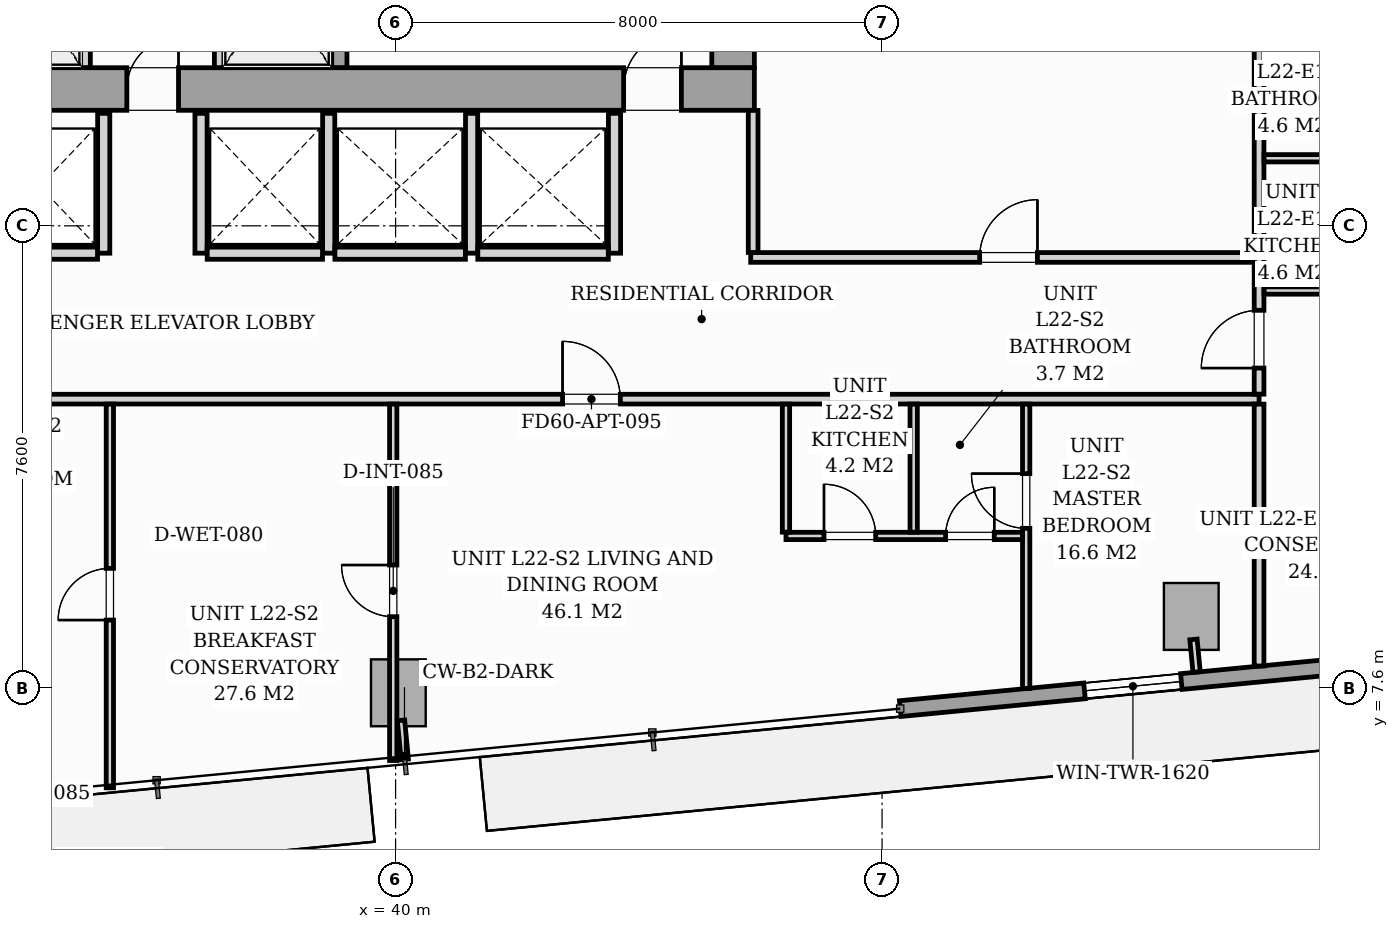
"""IFC4 building model, lengths in metres.
Left out: names, types, materials, properties, quantities, classifications, styles, units other than length and angle.
Written with IfcOpenShell. Run it as: python <this file> out.ifc"""

import sys

from ifc_helpers import new_model, si_unit, direction, frame, frame_2d, origin, origin_2d, place, context, subcontext, project, spatial, rectangle, i_section, extrude, source, transform, mapped, element, fill, save


model = new_model("IFC4")
c1 = context("Model", 3, precision=1e-05, world=origin(), true_north=direction((0.0, 1.0)))
c2 = subcontext(c1, "Body", "Model", "MODEL_VIEW")
j1 = project(units=[si_unit("LENGTHUNIT", "METRE"), si_unit("PLANEANGLEUNIT", "RADIAN")], contexts=[c1])
p1 = place(None, origin())
s1 = spatial("IfcSite", under=j1, at=p1, CompositionType="ELEMENT")
p2 = place(p1, origin())
s2 = spatial("IfcBuilding", under=s1, at=p2, CompositionType="ELEMENT")
p3 = place(p2, frame((0.0, 0.0, 81.0)))
s3 = spatial("IfcBuildingStorey", under=s2, at=p3, CompositionType="ELEMENT", Elevation=81.0)
m1 = source(origin(), c2, "Body", "SweptSolid", [
    extrude(i_section(OverallWidth=0.427, OverallDepth=0.483, WebThickness=0.051, FlangeThickness=0.082, FilletRadius=0.018, at=origin_2d()), origin(), (0.0, 0.0, 1.0), 3.196),
])
for number, where, z_axis, x_axis in (
    (1, (38.88, 17.4, 0.002), (0.0, 0.0, 1.0), (1.0, 0.0, 0.0)),
    (2, (45.6, 17.4, 0.002), (0.0, 0.0, 1.0), (1.0, 0.0, 0.0)),
):
    element("IfcColumn", number, at=place(p3, frame(where, z_axis=z_axis, x_axis=x_axis)), inside=s3, PredefinedType="PILASTER", context=c2, shape_type="MappedRepresentation", body=[
        mapped(m1, transform((0.0, 0.0, 0.0), scale=1.0)),
    ])
m2 = source(origin(), c2, "Body", "SweptSolid", [
    extrude(rectangle(XDim=0.9, YDim=1.1, at=origin_2d()), origin(), (0.0, 0.0, 1.0), 3.196),
])
for number, where, z_axis, x_axis in (
    (3, (40.045, 7.521, 0.002), (0.0, 0.0, 1.0), (0.995, 0.096, 0.0)),
    (4, (53.085, 8.776, 0.002), (0.0, 0.0, 1.0), (0.995, 0.096, 0.0)),
):
    element("IfcColumn", number, at=place(p3, frame(where, z_axis=z_axis, x_axis=x_axis)), inside=s3, PredefinedType="COLUMN", context=c2, shape_type="MappedRepresentation", body=[
        mapped(m2, transform((0.0, 0.0, 0.0), scale=1.0)),
    ])
p4 = place(p3, frame((67.32, 9.092, 0.0), z_axis=(0.0, 0.0, 1.0), x_axis=(-0.995396521236, -0.095842399342, 0.0)))
e5 = element("IfcWall", 5, at=p4, inside=s3, PredefinedType="STANDARD", context=c2, shape_type="SweptSolid", body=[
    extrude(rectangle(XDim=19.11, YDim=0.26, at=frame_2d((9.555, 0.0))), origin(), (0.0, 0.0, 1.0), 2.94),
])
p5 = place(p4, frame((9.563, 0.0, 0.0)))
e6 = element("IfcOpeningElement", 6, at=p5, cuts=e5, PredefinedType="OPENING", context=c2, shape_type="SweptSolid", body=[
    extrude(rectangle(XDim=1.8, YDim=2.06, at=frame_2d((0.9, 1.03))), frame((0.0, 0.14, 0.0), z_axis=(0.0, -1.0, 0.0), x_axis=(1.0, 0.0, 0.0)), (0.0, 0.0, 1.0), 0.28),
])
p6 = place(p4, frame((2.05, 0.0, 0.65)))
e7 = element("IfcOpeningElement", 7, at=p6, cuts=e5, PredefinedType="OPENING", context=c2, shape_type="SweptSolid", body=[
    extrude(rectangle(XDim=1.6, YDim=1.5, at=frame_2d((0.8, 0.75))), frame((0.0, 0.14, 0.0), z_axis=(0.0, -1.0, 0.0), x_axis=(1.0, 0.0, 0.0)), (0.0, 0.0, 1.0), 0.28),
])
p7 = place(p4, frame((14.465, 0.0, 0.75)))
e8 = element("IfcOpeningElement", 8, at=p7, cuts=e5, PredefinedType="OPENING", context=c2, shape_type="SweptSolid", body=[
    extrude(rectangle(XDim=1.6, YDim=1.5, at=frame_2d((0.8, 0.75))), frame((0.0, 0.14, 0.0), z_axis=(0.0, -1.0, 0.0), x_axis=(1.0, 0.0, 0.0)), (0.0, 0.0, 1.0), 0.28),
])
p8 = place(p3, frame((26.1, 17.45, 0.0), z_axis=(0.0, 0.0, 1.0), x_axis=(1.0, 0.0, 0.0)))
e9 = element("IfcWall", 9, at=p8, inside=s3, PredefinedType="SHEAR", context=c2, shape_type="SweptSolid", body=[
    extrude(rectangle(XDim=19.8, YDim=0.7, at=frame_2d((9.9, 0.0))), origin(), (0.0, 0.0, 1.0), 3.2),
])
p9 = place(p8, frame((1.05, 0.0, 0.0)))
e10 = element("IfcOpeningElement", 10, at=p9, cuts=e9, PredefinedType="OPENING", context=c2, shape_type="SweptSolid", body=[
    extrude(rectangle(XDim=0.95, YDim=2.06, at=frame_2d((0.475, 1.03))), frame((0.0, 0.36, 0.0), z_axis=(0.0, -1.0, 0.0), x_axis=(1.0, 0.0, 0.0)), (0.0, 0.0, 1.0), 0.72),
])
p10 = place(p8, frame((9.48, 0.0, 0.0)))
e11 = element("IfcOpeningElement", 11, at=p10, cuts=e9, PredefinedType="OPENING", context=c2, shape_type="SweptSolid", body=[
    extrude(rectangle(XDim=0.85, YDim=2.0, at=frame_2d((0.425, 1.0))), frame((0.0, 0.36, 0.0), z_axis=(0.0, -1.0, 0.0), x_axis=(1.0, 0.0, 0.0)), (0.0, 0.0, 1.0), 0.72),
])
p11 = place(p8, frame((17.65, 0.0, 0.0)))
e12 = element("IfcOpeningElement", 12, at=p11, cuts=e9, PredefinedType="OPENING", context=c2, shape_type="SweptSolid", body=[
    extrude(rectangle(XDim=0.95, YDim=2.06, at=frame_2d((0.475, 1.03))), frame((0.0, 0.36, 0.0), z_axis=(0.0, -1.0, 0.0), x_axis=(1.0, 0.0, 0.0)), (0.0, 0.0, 1.0), 0.72),
])
p12 = place(p3, frame((45.55, 17.802, 0.0), z_axis=(0.0, 0.0, 1.0), x_axis=(0.0, 1.0, 0.0)))
e13 = element("IfcWall", 13, at=p12, inside=s3, PredefinedType="SHEAR", context=c2, shape_type="SweptSolid", body=[
    extrude(rectangle(XDim=5.796, YDim=0.7, at=frame_2d((2.898, 0.0))), origin(), (0.0, 0.0, 1.0), 3.2),
])
for number, where, z_axis, x_axis in (
    (14, (34.9, 17.802, 0.0), (0.0, 0.0, 1.0), (0.0, 1.0, 0.0)),
    (15, (37.1, 17.802, 0.0), (0.0, 0.0, 1.0), (0.0, 1.0, 0.0)),
):
    element("IfcWall", number, at=place(p3, frame(where, z_axis=z_axis, x_axis=x_axis)), inside=s3, PredefinedType="PARTITIONING", context=c2, shape_type="SweptSolid", body=[
        extrude(rectangle(XDim=2.646, YDim=0.16, at=frame_2d((1.323, 0.0))), origin(), (0.0, 0.0, 1.0), 2.94),
    ])
p13 = place(p3, frame((39.075, 17.802, 0.0), z_axis=(0.0, 0.0, 1.0), x_axis=(0.0, 1.0, 0.0)))
e16 = element("IfcWall", 16, at=p13, inside=s3, PredefinedType="SOLIDWALL", context=c2, shape_type="SweptSolid", body=[
    extrude(rectangle(XDim=2.646, YDim=0.25, at=frame_2d((1.323, 0.0))), origin(), (0.0, 0.0, 1.0), 3.2),
])
p14 = place(p13, frame((0.598, 0.0, 0.0)))
e17 = element("IfcOpeningElement", 17, at=p14, cuts=e16, PredefinedType="OPENING", context=c2, shape_type="SweptSolid", body=[
    extrude(rectangle(XDim=1.1, YDim=2.08, at=frame_2d((0.55, 1.04))), frame((0.0, 0.135, 0.0), z_axis=(0.0, -1.0, 0.0), x_axis=(1.0, 0.0, 0.0)), (0.0, 0.0, 1.0), 0.27),
])
p15 = place(p3, frame((35.2, 14.75, 0.0), z_axis=(0.0, 0.0, 1.0), x_axis=(0.0, 1.0, 0.0)))
e18 = element("IfcWall", 18, at=p15, inside=s3, PredefinedType="PARTITIONING", context=c2, shape_type="SweptSolid", body=[
    extrude(rectangle(XDim=2.3, YDim=0.2, at=frame_2d((1.15, 0.0))), origin(), (0.0, 0.0, 1.0), 2.94),
])
p16 = place(p3, frame((33.202, 14.75, 0.0), z_axis=(0.0, 0.0, 1.0), x_axis=(1.0, 0.0, 0.0)))
e19 = element("IfcWall", 19, at=p16, inside=s3, PredefinedType="PARTITIONING", context=c2, shape_type="SweptSolid", body=[
    extrude(rectangle(XDim=1.896, YDim=0.2, at=frame_2d((0.948, 0.0))), origin(), (0.0, 0.0, 1.0), 2.94),
])
for number, where, z_axis, x_axis in (
    (20, (36.8, 14.75, 0.0), (0.0, 0.0, 1.0), (0.0, 1.0, 0.0)),
    (21, (38.9, 14.75, 0.0), (0.0, 0.0, 1.0), (0.0, 1.0, 0.0)),
):
    element("IfcWall", number, at=place(p3, frame(where, z_axis=z_axis, x_axis=x_axis)), inside=s3, PredefinedType="PARTITIONING", context=c2, shape_type="SweptSolid", body=[
        extrude(rectangle(XDim=2.3, YDim=0.2, at=frame_2d((1.15, 0.0))), origin(), (0.0, 0.0, 1.0), 2.94),
    ])
p17 = place(p3, frame((36.902, 14.75, 0.0), z_axis=(0.0, 0.0, 1.0), x_axis=(1.0, 0.0, 0.0)))
e22 = element("IfcWall", 22, at=p17, inside=s3, PredefinedType="PARTITIONING", context=c2, shape_type="SweptSolid", body=[
    extrude(rectangle(XDim=1.896, YDim=0.2, at=frame_2d((0.948, 0.0))), origin(), (0.0, 0.0, 1.0), 2.94),
])
for number, where, z_axis, x_axis in (
    (23, (41.25, 14.75, 0.0), (0.0, 0.0, 1.0), (0.0, 1.0, 0.0)),
    (24, (43.6, 14.75, 0.0), (0.0, 0.0, 1.0), (0.0, 1.0, 0.0)),
):
    element("IfcWall", number, at=place(p3, frame(where, z_axis=z_axis, x_axis=x_axis)), inside=s3, PredefinedType="PARTITIONING", context=c2, shape_type="SweptSolid", body=[
        extrude(rectangle(XDim=2.3, YDim=0.2, at=frame_2d((1.15, 0.0))), origin(), (0.0, 0.0, 1.0), 2.94),
    ])
for number, where, z_axis, x_axis in (
    (25, (39.002, 14.75, 0.0), (0.0, 0.0, 1.0), (1.0, 0.0, 0.0)),
    (26, (41.352, 14.75, 0.0), (0.0, 0.0, 1.0), (1.0, 0.0, 0.0)),
):
    element("IfcWall", number, at=place(p3, frame(where, z_axis=z_axis, x_axis=x_axis)), inside=s3, PredefinedType="PARTITIONING", context=c2, shape_type="SweptSolid", body=[
        extrude(rectangle(XDim=2.146, YDim=0.2, at=frame_2d((1.073, 0.0))), origin(), (0.0, 0.0, 1.0), 2.94),
    ])
p18 = place(p3, frame((16.6, 12.35, 0.0), z_axis=(0.0, 0.0, 1.0), x_axis=(1.0, 0.0, 0.0)))
e27 = element("IfcWall", 27, at=p18, inside=s3, PredefinedType="PARTITIONING", context=c2, shape_type="SweptSolid", body=[
    extrude(rectangle(XDim=37.6, YDim=0.16, at=frame_2d((18.8, 0.0))), origin(), (0.0, 0.0, 1.0), 2.94),
])
p19 = place(p18, frame((2.091, 0.0, 0.0)))
e28 = element("IfcOpeningElement", 28, at=p19, cuts=e27, PredefinedType="OPENING", context=c2, shape_type="SweptSolid", body=[
    extrude(rectangle(XDim=0.95, YDim=2.06, at=frame_2d((0.475, 1.03))), frame((0.0, 0.09, 0.0), z_axis=(0.0, -1.0, 0.0), x_axis=(1.0, 0.0, 0.0)), (0.0, 0.0, 1.0), 0.18),
])
p20 = place(p18, frame((26.146, 0.0, 0.0)))
e29 = element("IfcOpeningElement", 29, at=p20, cuts=e27, PredefinedType="OPENING", context=c2, shape_type="SweptSolid", body=[
    extrude(rectangle(XDim=0.95, YDim=2.06, at=frame_2d((0.475, 1.03))), frame((0.0, 0.09, 0.0), z_axis=(0.0, -1.0, 0.0), x_axis=(1.0, 0.0, 0.0)), (0.0, 0.0, 1.0), 0.18),
])
p21 = place(p3, frame((54.2, 7.961, 0.0), z_axis=(0.0, 0.0, 1.0), x_axis=(0.0, 1.0, 0.0)))
e30 = element("IfcWall", 30, at=p21, inside=s3, PredefinedType="PARTITIONING", context=c2, shape_type="SweptSolid", body=[
    extrude(rectangle(XDim=4.307, YDim=0.16, at=frame_2d((2.153, 0.0))), origin(), (0.0, 0.0, 1.0), 2.94),
])
p22 = place(p3, frame((54.2, 12.432, 0.0), z_axis=(0.0, 0.0, 1.0), x_axis=(0.0, 1.0, 0.0)))
e31 = element("IfcWall", 31, at=p22, inside=s3, PredefinedType="PARTITIONING", context=c2, shape_type="SweptSolid", body=[
    extrude(rectangle(XDim=15.095, YDim=0.16, at=frame_2d((7.548, 0.0))), origin(), (0.0, 0.0, 1.0), 2.94),
])
p23 = place(p22, frame((0.429, 0.0, 0.0)))
e32 = element("IfcOpeningElement", 32, at=p23, cuts=e31, PredefinedType="OPENING", context=c2, shape_type="SweptSolid", body=[
    extrude(rectangle(XDim=0.95, YDim=2.06, at=frame_2d((0.475, 1.03))), frame((0.0, 0.09, 0.0), z_axis=(0.0, -1.0, 0.0), x_axis=(1.0, 0.0, 0.0)), (0.0, 0.0, 1.0), 0.18),
])
p24 = place(p3, frame((50.37, 7.593, 0.0), z_axis=(0.0, 0.0, 1.0), x_axis=(0.0, 1.0, 0.0)))
e33 = element("IfcWall", 33, at=p24, inside=s3, PredefinedType="PARTITIONING", context=c2, shape_type="SweptSolid", body=[
    extrude(rectangle(XDim=4.676, YDim=0.12, at=frame_2d((2.338, 0.0))), origin(), (0.0, 0.0, 1.0), 2.94),
])
p25 = place(p24, frame((2.633, 0.0, 0.0)))
e34 = element("IfcOpeningElement", 34, at=p25, cuts=e33, PredefinedType="OPENING", context=c2, shape_type="SweptSolid", body=[
    extrude(rectangle(XDim=0.9, YDim=2.05, at=frame_2d((0.45, 1.025))), frame((0.0, 0.07, 0.0), z_axis=(0.0, -1.0, 0.0), x_axis=(1.0, 0.0, 0.0)), (0.0, 0.0, 1.0), 0.14),
])
p26 = place(p3, frame((46.42, 10.1, 0.0), z_axis=(0.0, 0.0, 1.0), x_axis=(1.0, 0.0, 0.0)))
e35 = element("IfcWall", 35, at=p26, inside=s3, PredefinedType="PARTITIONING", context=c2, shape_type="SweptSolid", body=[
    extrude(rectangle(XDim=3.888, YDim=0.12, at=frame_2d((1.944, 0.0))), origin(), (0.0, 0.0, 1.0), 2.94),
])
p27 = place(p26, frame((0.625, 0.0, 0.0)))
e36 = element("IfcOpeningElement", 36, at=p27, cuts=e35, PredefinedType="OPENING", context=c2, shape_type="SweptSolid", body=[
    extrude(rectangle(XDim=0.85, YDim=2.05, at=frame_2d((0.425, 1.025))), frame((0.0, 0.07, 0.0), z_axis=(0.0, -1.0, 0.0), x_axis=(1.0, 0.0, 0.0)), (0.0, 0.0, 1.0), 0.14),
])
p28 = place(p26, frame((2.625, 0.0, 0.0)))
e37 = element("IfcOpeningElement", 37, at=p28, cuts=e35, PredefinedType="OPENING", context=c2, shape_type="SweptSolid", body=[
    extrude(rectangle(XDim=0.8, YDim=2.02, at=frame_2d((0.4, 1.01))), frame((0.0, 0.07, 0.0), z_axis=(0.0, -1.0, 0.0), x_axis=(1.0, 0.0, 0.0)), (0.0, 0.0, 1.0), 0.14),
])
for number, where, z_axis, x_axis in (
    (38, (48.52, 10.162, 0.0), (0.0, 0.0, 1.0), (0.0, 1.0, 0.0)),
    (39, (46.42, 10.162, 0.0), (0.0, 0.0, 1.0), (0.0, 1.0, 0.0)),
):
    element("IfcWall", number, at=place(p3, frame(where, z_axis=z_axis, x_axis=x_axis)), inside=s3, PredefinedType="PARTITIONING", context=c2, shape_type="SweptSolid", body=[
        extrude(rectangle(XDim=2.106, YDim=0.12, at=frame_2d((1.053, 0.0))), origin(), (0.0, 0.0, 1.0), 2.94),
    ])
p29 = place(p3, frame((35.301, 5.958, 0.0), z_axis=(0.0, 0.0, 1.0), x_axis=(0.0, 1.0, 0.0)))
e40 = element("IfcWall", 40, at=p29, inside=s3, PredefinedType="PARTITIONING", context=c2, shape_type="SweptSolid", body=[
    extrude(rectangle(XDim=6.31, YDim=0.12, at=frame_2d((3.155, 0.0))), origin(), (0.0, 0.0, 1.0), 2.94),
])
p30 = place(p29, frame((2.758, 0.0, 0.0)))
e41 = element("IfcOpeningElement", 41, at=p30, cuts=e40, PredefinedType="OPENING", context=c2, shape_type="SweptSolid", body=[
    extrude(rectangle(XDim=0.85, YDim=2.05, at=frame_2d((0.425, 1.025))), frame((0.0, 0.07, 0.0), z_axis=(0.0, -1.0, 0.0), x_axis=(1.0, 0.0, 0.0)), (0.0, 0.0, 1.0), 0.14),
])
p31 = place(p3, frame((39.961, 6.407, 0.0), z_axis=(0.0, 0.0, 1.0), x_axis=(0.0, 1.0, 0.0)))
e42 = element("IfcWall", 42, at=p31, inside=s3, PredefinedType="PARTITIONING", context=c2, shape_type="SweptSolid", body=[
    extrude(rectangle(XDim=5.861, YDim=0.12, at=frame_2d((2.93, 0.0))), origin(), (0.0, 0.0, 1.0), 2.94),
])
p32 = place(p31, frame((2.365, 0.0, 0.0)))
e43 = element("IfcOpeningElement", 43, at=p32, cuts=e42, PredefinedType="OPENING", context=c2, shape_type="SweptSolid", body=[
    extrude(rectangle(XDim=0.85, YDim=2.05, at=frame_2d((0.425, 1.025))), frame((0.0, 0.07, 0.0), z_axis=(0.0, -1.0, 0.0), x_axis=(1.0, 0.0, 0.0)), (0.0, 0.0, 1.0), 0.14),
])
for number, where, z_axis, x_axis in (
    (44, (54.282, 16.311, 0.0), (0.0, 0.0, 1.0), (1.0, 0.0, 0.0)),
    (45, (54.282, 14.136, 0.0), (0.0, 0.0, 1.0), (1.0, 0.0, 0.0)),
):
    element("IfcWall", number, at=place(p3, frame(where, z_axis=z_axis, x_axis=x_axis)), inside=s3, PredefinedType="PARTITIONING", context=c2, shape_type="SweptSolid", body=[
        extrude(rectangle(XDim=2.256, YDim=0.12, at=frame_2d((1.128, 0.0))), origin(), (0.0, 0.0, 1.0), 2.94),
    ])
p33 = place(p3, frame((54.282, 10.362, 0.0), z_axis=(0.0, 0.0, 1.0), x_axis=(1.0, 0.0, 0.0)))
e46 = element("IfcWall", 46, at=p33, inside=s3, PredefinedType="PARTITIONING", context=c2, shape_type="SweptSolid", body=[
    extrude(rectangle(XDim=12.265, YDim=0.12, at=frame_2d((6.132, 0.0))), origin(), (0.0, 0.0, 1.0), 2.94),
])
p34 = place(p33, frame((4.853, 0.0, 0.0)))
e47 = element("IfcOpeningElement", 47, at=p34, cuts=e46, PredefinedType="OPENING", context=c2, shape_type="SweptSolid", body=[
    extrude(rectangle(XDim=0.85, YDim=2.05, at=frame_2d((0.425, 1.025))), frame((0.0, 0.07, 0.0), z_axis=(0.0, -1.0, 0.0), x_axis=(1.0, 0.0, 0.0)), (0.0, 0.0, 1.0), 0.14),
])
p35 = place(p3, frame((45.84, 14.68, 0.0), z_axis=(0.0, 0.0, 1.0), x_axis=(1.0, 0.0, 0.0)))
e48 = element("IfcWall", 48, at=p35, inside=s3, PredefinedType="PARTITIONING", context=c2, shape_type="SweptSolid", body=[
    extrude(rectangle(XDim=8.278, YDim=0.16, at=frame_2d((4.139, 0.0))), origin(), (0.0, 0.0, 1.0), 2.94),
])
p36 = place(p35, frame((3.765, 0.0, 0.0)))
e49 = element("IfcOpeningElement", 49, at=p36, cuts=e48, PredefinedType="OPENING", context=c2, shape_type="SweptSolid", body=[
    extrude(rectangle(XDim=0.95, YDim=2.06, at=frame_2d((0.475, 1.03))), frame((0.0, 0.09, 0.0), z_axis=(0.0, -1.0, 0.0), x_axis=(1.0, 0.0, 0.0)), (0.0, 0.0, 1.0), 0.18),
])
p37 = place(p3, frame((45.88, 14.762, 0.0), z_axis=(0.0, 0.0, 1.0), x_axis=(0.0, 1.0, 0.0)))
e50 = element("IfcWall", 50, at=p37, inside=s3, PredefinedType="PARTITIONING", context=c2, shape_type="SweptSolid", body=[
    extrude(rectangle(XDim=2.336, YDim=0.16, at=frame_2d((1.168, 0.0))), origin(), (0.0, 0.0, 1.0), 2.94),
])
p38 = place(p3, frame((40.089, 7.067, 0.0), z_axis=(0.0, 0.0, 1.0), x_axis=(0.095791766065, -0.995401395194, 0.0)))
e51 = element("IfcWall", 51, at=p38, inside=s3, PredefinedType="PARTITIONING", context=c2, shape_type="SweptSolid", body=[
    extrude(rectangle(XDim=0.645, YDim=0.12, at=frame_2d((0.322, 0.0))), origin(), (0.0, 0.0, 1.0), 2.94),
])
p39 = place(p3, frame((53.121, 8.398, 0.0), z_axis=(0.0, 0.0, 1.0), x_axis=(0.096179204763, -0.995364034196, 0.0)))
e52 = element("IfcWall", 52, at=p39, inside=s3, PredefinedType="PARTITIONING", context=c2, shape_type="SweptSolid", body=[
    extrude(rectangle(XDim=0.538, YDim=0.12, at=frame_2d((0.269, 0.0))), origin(), (0.0, 0.0, 1.0), 2.94),
])
m3 = source(origin(), c2, "Body", "SweptSolid", [
    extrude(rectangle(XDim=1.6, YDim=1.5, at=frame_2d((0.8, 0.75))), frame((0.0, 0.03, 0.0), z_axis=(0.0, -1.0, 0.0), x_axis=(1.0, 0.0, 0.0)), (0.0, 0.0, 1.0), 0.06),
])
p40 = place(p7, origin())
e53 = element("IfcWindow", 53, at=p40, inside=s3, PartitioningType="SINGLE_PANEL", PredefinedType="WINDOW", context=c2, shape_type="MappedRepresentation", body=[
    mapped(m3, transform((0.0, 0.0, 0.0), scale=1.0)),
])
fill(e8, e53)
m4 = source(origin(), c2, "Body", "SweptSolid", [
    extrude(rectangle(XDim=0.85, YDim=2.0, at=frame_2d((0.425, 1.0))), frame((0.0, 0.025, 0.0), z_axis=(0.0, -1.0, 0.0), x_axis=(1.0, 0.0, 0.0)), (0.0, 0.0, 1.0), 0.05),
])
p41 = place(p10, origin())
e54 = element("IfcDoor", 54, at=p41, inside=s3, OperationType="SINGLE_SWING_RIGHT", PredefinedType="DOOR", context=c2, shape_type="MappedRepresentation", body=[
    mapped(m4, transform((0.0, 0.0, 0.0), scale=1.0)),
])
fill(e11, e54)
m5 = source(origin(), c2, "Body", "SweptSolid", [
    extrude(rectangle(XDim=0.95, YDim=2.06, at=frame_2d((0.475, 1.03))), frame((0.0, 0.025, 0.0), z_axis=(0.0, -1.0, 0.0), x_axis=(1.0, 0.0, 0.0)), (0.0, 0.0, 1.0), 0.05),
])
p42 = place(p11, origin())
e55 = element("IfcDoor", 55, at=p42, inside=s3, OperationType="SINGLE_SWING_RIGHT", PredefinedType="DOOR", context=c2, shape_type="MappedRepresentation", body=[
    mapped(m5, transform((0.0, 0.0, 0.0), scale=1.0)),
])
fill(e12, e55)
m6 = source(origin(), c2, "Body", "SweptSolid", [
    extrude(rectangle(XDim=0.85, YDim=2.05, at=frame_2d((0.425, 1.025))), frame((0.0, 0.025, 0.0), z_axis=(0.0, -1.0, 0.0), x_axis=(1.0, 0.0, 0.0)), (0.0, 0.0, 1.0), 0.05),
])
p43 = place(p30, origin())
e56 = element("IfcDoor", 56, at=p43, inside=s3, OperationType="SINGLE_SWING_LEFT", PredefinedType="DOOR", context=c2, shape_type="MappedRepresentation", body=[
    mapped(m6, transform((0.0, 0.0, 0.0), scale=1.0)),
])
fill(e41, e56)
p44 = place(p32, origin())
e57 = element("IfcDoor", 57, at=p44, inside=s3, OperationType="SINGLE_SWING_RIGHT", PredefinedType="DOOR", context=c2, shape_type="MappedRepresentation", body=[
    mapped(m6, transform((0.0, 0.0, 0.0), scale=1.0)),
])
fill(e43, e57)
m7 = source(origin(), c2, "Body", "SweptSolid", [
    extrude(rectangle(XDim=0.95, YDim=2.06, at=frame_2d((0.475, 1.03))), frame((0.0, 0.025, 0.0), z_axis=(0.0, -1.0, 0.0), x_axis=(1.0, 0.0, 0.0)), (0.0, 0.0, 1.0), 0.05),
])
p45 = place(p20, origin())
e58 = element("IfcDoor", 58, at=p45, inside=s3, OperationType="SINGLE_SWING_LEFT", PredefinedType="DOOR", context=c2, shape_type="MappedRepresentation", body=[
    mapped(m7, transform((0.0, 0.0, 0.0), scale=1.0)),
])
fill(e29, e58)
m8 = source(origin(), c2, "Body", "SweptSolid", [
    extrude(rectangle(XDim=0.9, YDim=2.05, at=frame_2d((0.45, 1.025))), frame((0.0, 0.025, 0.0), z_axis=(0.0, -1.0, 0.0), x_axis=(1.0, 0.0, 0.0)), (0.0, 0.0, 1.0), 0.05),
])
p46 = place(p25, origin())
e59 = element("IfcDoor", 59, at=p46, inside=s3, OperationType="SINGLE_SWING_RIGHT", PredefinedType="DOOR", context=c2, shape_type="MappedRepresentation", body=[
    mapped(m8, transform((0.0, 0.0, 0.0), scale=1.0)),
])
fill(e34, e59)
p47 = place(p27, origin())
e60 = element("IfcDoor", 60, at=p47, inside=s3, OperationType="SINGLE_SWING_LEFT", PredefinedType="DOOR", context=c2, shape_type="MappedRepresentation", body=[
    mapped(m6, transform((0.0, 0.0, 0.0), scale=1.0)),
])
fill(e36, e60)
m9 = source(origin(), c2, "Body", "SweptSolid", [
    extrude(rectangle(XDim=0.8, YDim=2.02, at=frame_2d((0.4, 1.01))), frame((0.0, 0.025, 0.0), z_axis=(0.0, -1.0, 0.0), x_axis=(1.0, 0.0, 0.0)), (0.0, 0.0, 1.0), 0.05),
])
p48 = place(p28, origin())
e61 = element("IfcDoor", 61, at=p48, inside=s3, OperationType="SINGLE_SWING_RIGHT", PredefinedType="DOOR", context=c2, shape_type="MappedRepresentation", body=[
    mapped(m9, transform((0.0, 0.0, 0.0), scale=1.0)),
])
fill(e37, e61)
p49 = place(p23, origin())
e62 = element("IfcDoor", 62, at=p49, inside=s3, OperationType="SINGLE_SWING_LEFT", PredefinedType="DOOR", context=c2, shape_type="MappedRepresentation", body=[
    mapped(m7, transform((0.0, 0.0, 0.0), scale=1.0)),
])
fill(e32, e62)
p50 = place(p36, origin())
e63 = element("IfcDoor", 63, at=p50, inside=s3, OperationType="SINGLE_SWING_RIGHT", PredefinedType="DOOR", context=c2, shape_type="MappedRepresentation", body=[
    mapped(m7, transform((0.0, 0.0, 0.0), scale=1.0)),
])
fill(e49, e63)
save(model, sys.argv[1])
